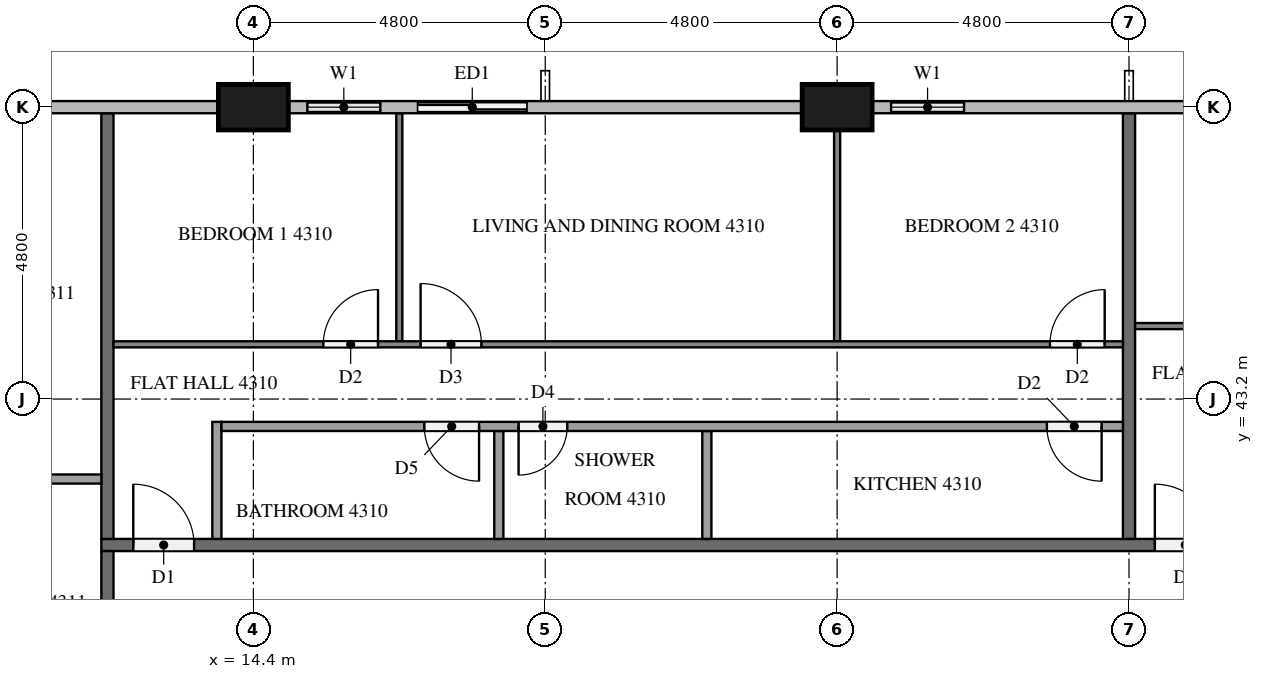
"""IFC4 building model, lengths in metres.
Left out: names, types, materials, properties, quantities, classifications, styles, units other than length and angle.
Written with IfcOpenShell. Run it as: python <this file> out.ifc"""

import sys

from ifc_helpers import new_model, si_unit, direction, frame, frame_2d, origin, origin_2d, place, context, subcontext, project, spatial, rectangle, extrude, element, fill, save


model = new_model("IFC4")
c1 = context("Model", 3, precision=1e-05, world=origin(), true_north=direction((0.0, 1.0)))
c2 = subcontext(c1, "Body", "Model", "MODEL_VIEW")
j1 = project(units=[si_unit("LENGTHUNIT", "METRE"), si_unit("PLANEANGLEUNIT", "RADIAN")], contexts=[c1])
p1 = place(None, origin())
s1 = spatial("IfcSite", under=j1, at=p1, CompositionType="ELEMENT")
p2 = place(p1, origin())
s2 = spatial("IfcBuilding", under=s1, at=p2, CompositionType="ELEMENT")
p3 = place(p2, frame((0.0, 0.0, 166.5)))
s3 = spatial("IfcBuildingStorey", under=s2, at=p3, CompositionType="ELEMENT", Elevation=166.5)
for number, where, z_axis, x_axis in (
    (1, (24.0, 48.0, 0.0), (0.0, 0.0, 1.0), (1.0, 0.0, 0.0)),
    (2, (14.4, 48.0, 0.0), (0.0, 0.0, 1.0), (1.0, 0.0, 0.0)),
):
    element("IfcColumn", number, at=place(p3, frame(where, z_axis=z_axis, x_axis=x_axis)), inside=s3, PredefinedType="COLUMN", context=c2, shape_type="SweptSolid", body=[
        extrude(rectangle(XDim=1.15, YDim=0.75, at=origin_2d()), origin(), (0.0, 0.0, 1.0), 3.2),
    ])
p4 = place(p3, frame((26.4, 48.0, 0.0), z_axis=(0.0, 0.0, 1.0), x_axis=(-1.0, 0.0, 0.0)))
e3 = element("IfcWall", 3, at=p4, inside=s3, PredefinedType="SOLIDWALL", context=c2, shape_type="SweptSolid", body=[
    extrude(rectangle(XDim=1.825, YDim=0.15, at=frame_2d((0.913, 0.0))), origin(), (0.0, 0.0, 1.0), 3.2),
])
p5 = place(p4, frame((0.312, 0.0, 0.9)))
e4 = element("IfcOpeningElement", 4, at=p5, cuts=e3, PredefinedType="OPENING", context=c2, shape_type="SweptSolid", body=[
    extrude(rectangle(XDim=1.2, YDim=1.4, at=frame_2d((0.6, 0.7))), frame((0.0, 0.085, 0.0), z_axis=(0.0, -1.0, 0.0), x_axis=(1.0, 0.0, 0.0)), (0.0, 0.0, 1.0), 0.17),
])
p6 = place(p3, frame((19.2, 48.0, 0.0), z_axis=(0.0, 0.0, 1.0), x_axis=(-1.0, 0.0, 0.0)))
e5 = element("IfcWall", 5, at=p6, inside=s3, PredefinedType="SOLIDWALL", context=c2, shape_type="SweptSolid", body=[
    extrude(rectangle(XDim=4.225, YDim=0.15, at=frame_2d((2.112, 0.0))), origin(), (0.0, 0.0, 1.0), 3.2),
])
p7 = place(p6, frame((0.3, 0.0, 0.0)))
e6 = element("IfcOpeningElement", 6, at=p7, cuts=e5, PredefinedType="OPENING", context=c2, shape_type="SweptSolid", body=[
    extrude(rectangle(XDim=1.8, YDim=2.4, at=frame_2d((0.9, 1.2))), frame((0.0, 0.085, 0.0), z_axis=(0.0, -1.0, 0.0), x_axis=(1.0, 0.0, 0.0)), (0.0, 0.0, 1.0), 0.17),
])
p8 = place(p6, frame((2.712, 0.0, 0.9)))
e7 = element("IfcOpeningElement", 7, at=p8, cuts=e5, PredefinedType="OPENING", context=c2, shape_type="SweptSolid", body=[
    extrude(rectangle(XDim=1.2, YDim=1.4, at=frame_2d((0.6, 0.7))), frame((0.0, 0.085, 0.0), z_axis=(0.0, -1.0, 0.0), x_axis=(1.0, 0.0, 0.0)), (0.0, 0.0, 1.0), 0.17),
])
p9 = place(p3, frame((11.9, 40.8, 0.0), z_axis=(0.0, 0.0, 1.0), x_axis=(1.0, 0.0, 0.0)))
e8 = element("IfcWall", 8, at=p9, inside=s3, PredefinedType="PARTITIONING", context=c2, shape_type="SweptSolid", body=[
    extrude(rectangle(XDim=38.6, YDim=0.2, at=frame_2d((19.3, 0.0))), origin(), (0.0, 0.0, 1.0), 3.2),
])
p10 = place(p9, frame((31.725, 0.0, 0.0)))
e9 = element("IfcOpeningElement", 9, at=p10, cuts=e8, PredefinedType="OPENING", context=c2, shape_type="SweptSolid", body=[
    extrude(rectangle(XDim=1.0, YDim=2.1, at=frame_2d((0.5, 1.05))), frame((0.0, 0.11, 0.0), z_axis=(0.0, -1.0, 0.0), x_axis=(1.0, 0.0, 0.0)), (0.0, 0.0, 1.0), 0.22),
])
p11 = place(p9, frame((17.325, 0.0, 0.0)))
e10 = element("IfcOpeningElement", 10, at=p11, cuts=e8, PredefinedType="OPENING", context=c2, shape_type="SweptSolid", body=[
    extrude(rectangle(XDim=1.0, YDim=2.1, at=frame_2d((0.5, 1.05))), frame((0.0, 0.11, 0.0), z_axis=(0.0, -1.0, 0.0), x_axis=(1.0, 0.0, 0.0)), (0.0, 0.0, 1.0), 0.22),
])
p12 = place(p9, frame((0.525, 0.0, 0.0)))
e11 = element("IfcOpeningElement", 11, at=p12, cuts=e8, PredefinedType="OPENING", context=c2, shape_type="SweptSolid", body=[
    extrude(rectangle(XDim=1.0, YDim=2.1, at=frame_2d((0.5, 1.05))), frame((0.0, 0.11, 0.0), z_axis=(0.0, -1.0, 0.0), x_axis=(1.0, 0.0, 0.0)), (0.0, 0.0, 1.0), 0.22),
])
p13 = place(p3, frame((12.0, 12.1, 0.0), z_axis=(0.0, 0.0, 1.0), x_axis=(0.0, 1.0, 0.0)))
e12 = element("IfcWall", 12, at=p13, inside=s3, PredefinedType="PARTITIONING", context=c2, shape_type="SweptSolid", body=[
    extrude(rectangle(XDim=28.6, YDim=0.2, at=frame_2d((14.3, 0.0))), origin(), (0.0, 0.0, 1.0), 3.2),
])
p14 = place(p13, frame((24.325, 0.0, 0.0)))
e13 = element("IfcOpeningElement", 13, at=p14, cuts=e12, PredefinedType="OPENING", context=c2, shape_type="SweptSolid", body=[
    extrude(rectangle(XDim=1.0, YDim=2.1, at=frame_2d((0.5, 1.05))), frame((0.0, 0.11, 0.0), z_axis=(0.0, -1.0, 0.0), x_axis=(1.0, 0.0, 0.0)), (0.0, 0.0, 1.0), 0.22),
])
p15 = place(p13, frame((22.475, 0.0, 0.0)))
e14 = element("IfcOpeningElement", 14, at=p15, cuts=e12, PredefinedType="OPENING", context=c2, shape_type="SweptSolid", body=[
    extrude(rectangle(XDim=1.0, YDim=2.1, at=frame_2d((0.5, 1.05))), frame((0.0, 0.11, 0.0), z_axis=(0.0, -1.0, 0.0), x_axis=(1.0, 0.0, 0.0)), (0.0, 0.0, 1.0), 0.22),
])
p16 = place(p13, frame((0.325, 0.0, 0.0)))
e15 = element("IfcOpeningElement", 15, at=p16, cuts=e12, PredefinedType="OPENING", context=c2, shape_type="SweptSolid", body=[
    extrude(rectangle(XDim=1.0, YDim=2.1, at=frame_2d((0.5, 1.05))), frame((0.0, 0.11, 0.0), z_axis=(0.0, -1.0, 0.0), x_axis=(1.0, 0.0, 0.0)), (0.0, 0.0, 1.0), 0.22),
])
for number, where, z_axis, x_axis in (
    (16, (28.8, 47.9, 0.0), (0.0, 0.0, 1.0), (0.0, -1.0, 0.0)),
    (17, (12.0, 47.9, 0.0), (0.0, 0.0, 1.0), (0.0, -1.0, 0.0)),
):
    element("IfcWall", number, at=place(p3, frame(where, z_axis=z_axis, x_axis=x_axis)), inside=s3, PredefinedType="PARTITIONING", context=c2, shape_type="SweptSolid", body=[
        extrude(rectangle(XDim=7.0, YDim=0.2, at=frame_2d((3.5, 0.0))), origin(), (0.0, 0.0, 1.0), 3.2),
    ])
p17 = place(p3, frame((28.9, 44.4, 0.0), z_axis=(0.0, 0.0, 1.0), x_axis=(1.0, 0.0, 0.0)))
e18 = element("IfcWall", 18, at=p17, inside=s3, PredefinedType="PARTITIONING", context=c2, shape_type="SweptSolid", body=[
    extrude(rectangle(XDim=14.2, YDim=0.1, at=frame_2d((7.1, 0.0))), origin(), (0.0, 0.0, 1.0), 3.2),
])
p18 = place(p17, frame((3.45, 0.0, 0.0)))
e19 = element("IfcOpeningElement", 19, at=p18, cuts=e18, PredefinedType="OPENING", context=c2, shape_type="SweptSolid", body=[
    extrude(rectangle(XDim=0.9, YDim=2.1, at=frame_2d((0.45, 1.05))), frame((0.0, 0.06, 0.0), z_axis=(0.0, -1.0, 0.0), x_axis=(1.0, 0.0, 0.0)), (0.0, 0.0, 1.0), 0.12),
])
p19 = place(p17, frame((5.05, 0.0, 0.0)))
e20 = element("IfcOpeningElement", 20, at=p19, cuts=e18, PredefinedType="OPENING", context=c2, shape_type="SweptSolid", body=[
    extrude(rectangle(XDim=0.9, YDim=2.1, at=frame_2d((0.45, 1.05))), frame((0.0, 0.06, 0.0), z_axis=(0.0, -1.0, 0.0), x_axis=(1.0, 0.0, 0.0)), (0.0, 0.0, 1.0), 0.12),
])
p20 = place(p17, frame((12.9, 0.0, 0.0)))
e21 = element("IfcOpeningElement", 21, at=p20, cuts=e18, PredefinedType="OPENING", context=c2, shape_type="SweptSolid", body=[
    extrude(rectangle(XDim=1.0, YDim=2.1, at=frame_2d((0.5, 1.05))), frame((0.0, 0.06, 0.0), z_axis=(0.0, -1.0, 0.0), x_axis=(1.0, 0.0, 0.0)), (0.0, 0.0, 1.0), 0.12),
])
p21 = place(p3, frame((16.8, 44.15, 0.0), z_axis=(0.0, 0.0, 1.0), x_axis=(0.0, 1.0, 0.0)))
e22 = element("IfcWall", 22, at=p21, inside=s3, PredefinedType="PARTITIONING", context=c2, shape_type="SweptSolid", body=[
    extrude(rectangle(XDim=3.75, YDim=0.1, at=frame_2d((1.875, 0.0))), origin(), (0.0, 0.0, 1.0), 3.2),
])
p22 = place(p3, frame((24.0, 44.15, 0.0), z_axis=(0.0, 0.0, 1.0), x_axis=(0.0, 1.0, 0.0)))
e23 = element("IfcWall", 23, at=p22, inside=s3, PredefinedType="PARTITIONING", context=c2, shape_type="SweptSolid", body=[
    extrude(rectangle(XDim=3.475, YDim=0.1, at=frame_2d((1.738, 0.0))), origin(), (0.0, 0.0, 1.0), 3.2),
])
p23 = place(p3, frame((12.1, 44.1, 0.0), z_axis=(0.0, 0.0, 1.0), x_axis=(1.0, 0.0, 0.0)))
e24 = element("IfcWall", 24, at=p23, inside=s3, PredefinedType="PARTITIONING", context=c2, shape_type="SweptSolid", body=[
    extrude(rectangle(XDim=16.6, YDim=0.1, at=frame_2d((8.3, 0.0))), origin(), (0.0, 0.0, 1.0), 3.2),
])
p24 = place(p23, frame((3.45, 0.0, 0.0)))
e25 = element("IfcOpeningElement", 25, at=p24, cuts=e24, PredefinedType="OPENING", context=c2, shape_type="SweptSolid", body=[
    extrude(rectangle(XDim=0.9, YDim=2.1, at=frame_2d((0.45, 1.05))), frame((0.0, 0.06, 0.0), z_axis=(0.0, -1.0, 0.0), x_axis=(1.0, 0.0, 0.0)), (0.0, 0.0, 1.0), 0.12),
])
p25 = place(p23, frame((5.05, 0.0, 0.0)))
e26 = element("IfcOpeningElement", 26, at=p25, cuts=e24, PredefinedType="OPENING", context=c2, shape_type="SweptSolid", body=[
    extrude(rectangle(XDim=1.0, YDim=2.1, at=frame_2d((0.5, 1.05))), frame((0.0, 0.06, 0.0), z_axis=(0.0, -1.0, 0.0), x_axis=(1.0, 0.0, 0.0)), (0.0, 0.0, 1.0), 0.12),
])
p26 = place(p23, frame((15.4, 0.0, 0.0)))
e27 = element("IfcOpeningElement", 27, at=p26, cuts=e24, PredefinedType="OPENING", context=c2, shape_type="SweptSolid", body=[
    extrude(rectangle(XDim=0.9, YDim=2.1, at=frame_2d((0.45, 1.05))), frame((0.0, 0.06, 0.0), z_axis=(0.0, -1.0, 0.0), x_axis=(1.0, 0.0, 0.0)), (0.0, 0.0, 1.0), 0.12),
])
for number, where, z_axis, x_axis in (
    (28, (18.437, 40.9, 0.0), (0.0, 0.0, 1.0), (0.0, 1.0, 0.0)),
    (29, (21.858, 40.9, 0.0), (0.0, 0.0, 1.0), (0.0, 1.0, 0.0)),
):
    element("IfcWall", number, at=place(p3, frame(where, z_axis=z_axis, x_axis=x_axis)), inside=s3, PredefinedType="PARTITIONING", context=c2, shape_type="SweptSolid", body=[
        extrude(rectangle(XDim=1.775, YDim=0.15, at=frame_2d((0.888, 0.0))), origin(), (0.0, 0.0, 1.0), 3.2),
    ])
p27 = place(p3, frame((13.8, 40.9, 0.0), z_axis=(0.0, 0.0, 1.0), x_axis=(0.0, 1.0, 0.0)))
e30 = element("IfcWall", 30, at=p27, inside=s3, PredefinedType="PARTITIONING", context=c2, shape_type="SweptSolid", body=[
    extrude(rectangle(XDim=1.925, YDim=0.15, at=frame_2d((0.962, 0.0))), origin(), (0.0, 0.0, 1.0), 3.2),
])
p28 = place(p3, frame((28.7, 42.75, 0.0), z_axis=(0.0, 0.0, 1.0), x_axis=(-1.0, 0.0, 0.0)))
e31 = element("IfcWall", 31, at=p28, inside=s3, PredefinedType="PARTITIONING", context=c2, shape_type="SweptSolid", body=[
    extrude(rectangle(XDim=14.825, YDim=0.15, at=frame_2d((7.413, 0.0))), origin(), (0.0, 0.0, 1.0), 3.2),
])
p29 = place(p28, frame((10.588, 0.0, 0.0)))
e32 = element("IfcOpeningElement", 32, at=p29, cuts=e31, PredefinedType="OPENING", context=c2, shape_type="SweptSolid", body=[
    extrude(rectangle(XDim=0.9, YDim=2.1, at=frame_2d((0.45, 1.05))), frame((0.0, 0.085, 0.0), z_axis=(0.0, -1.0, 0.0), x_axis=(1.0, 0.0, 0.0)), (0.0, 0.0, 1.0), 0.17),
])
p30 = place(p28, frame((9.138, 0.0, 0.0)))
e33 = element("IfcOpeningElement", 33, at=p30, cuts=e31, PredefinedType="OPENING", context=c2, shape_type="SweptSolid", body=[
    extrude(rectangle(XDim=0.8, YDim=2.1, at=frame_2d((0.4, 1.05))), frame((0.0, 0.085, 0.0), z_axis=(0.0, -1.0, 0.0), x_axis=(1.0, 0.0, 0.0)), (0.0, 0.0, 1.0), 0.17),
])
p31 = place(p28, frame((0.35, 0.0, 0.0)))
e34 = element("IfcOpeningElement", 34, at=p31, cuts=e31, PredefinedType="OPENING", context=c2, shape_type="SweptSolid", body=[
    extrude(rectangle(XDim=0.9, YDim=2.1, at=frame_2d((0.45, 1.05))), frame((0.0, 0.085, 0.0), z_axis=(0.0, -1.0, 0.0), x_axis=(1.0, 0.0, 0.0)), (0.0, 0.0, 1.0), 0.17),
])
p32 = place(p3, frame((11.9, 41.885, 0.0), z_axis=(0.0, 0.0, 1.0), x_axis=(-1.0, 0.0, 0.0)))
e35 = element("IfcWall", 35, at=p32, inside=s3, PredefinedType="PARTITIONING", context=c2, shape_type="SweptSolid", body=[
    extrude(rectangle(XDim=2.975, YDim=0.15, at=frame_2d((1.487, 0.0))), origin(), (0.0, 0.0, 1.0), 3.2),
])
p33 = place(p5, origin())
e36 = element("IfcWindow", 36, at=p33, inside=s3, PartitioningType="SINGLE_PANEL", PredefinedType="WINDOW", context=c2, shape_type="SweptSolid", body=[
    extrude(rectangle(XDim=1.2, YDim=1.4, at=frame_2d((0.6, 0.7))), frame((0.0, 0.03, 0.0), z_axis=(0.0, -1.0, 0.0), x_axis=(1.0, 0.0, 0.0)), (0.0, 0.0, 1.0), 0.06),
])
fill(e4, e36)
p34 = place(p7, origin())
e37 = element("IfcDoor", 37, at=p34, inside=s3, OperationType="SLIDING_TO_RIGHT", PredefinedType="DOOR", context=c2, shape_type="SweptSolid", body=[
    extrude(rectangle(XDim=1.8, YDim=2.4, at=frame_2d((0.9, 1.2))), frame((0.0, 0.025, 0.0), z_axis=(0.0, -1.0, 0.0), x_axis=(1.0, 0.0, 0.0)), (0.0, 0.0, 1.0), 0.05),
])
fill(e6, e37)
p35 = place(p8, origin())
e38 = element("IfcWindow", 38, at=p35, inside=s3, PartitioningType="SINGLE_PANEL", PredefinedType="WINDOW", context=c2, shape_type="SweptSolid", body=[
    extrude(rectangle(XDim=1.2, YDim=1.4, at=frame_2d((0.6, 0.7))), frame((0.0, 0.03, 0.0), z_axis=(0.0, -1.0, 0.0), x_axis=(1.0, 0.0, 0.0)), (0.0, 0.0, 1.0), 0.06),
])
fill(e7, e38)
p36 = place(p11, origin())
e39 = element("IfcDoor", 39, at=p36, inside=s3, OperationType="SINGLE_SWING_LEFT", PredefinedType="DOOR", context=c2, shape_type="SweptSolid", body=[
    extrude(rectangle(XDim=1.0, YDim=2.1, at=frame_2d((0.5, 1.05))), frame((0.0, 0.025, 0.0), z_axis=(0.0, -1.0, 0.0), x_axis=(1.0, 0.0, 0.0)), (0.0, 0.0, 1.0), 0.05),
])
fill(e10, e39)
p37 = place(p12, origin())
e40 = element("IfcDoor", 40, at=p37, inside=s3, OperationType="SINGLE_SWING_LEFT", PredefinedType="DOOR", context=c2, shape_type="SweptSolid", body=[
    extrude(rectangle(XDim=1.0, YDim=2.1, at=frame_2d((0.5, 1.05))), frame((0.0, 0.025, 0.0), z_axis=(0.0, -1.0, 0.0), x_axis=(1.0, 0.0, 0.0)), (0.0, 0.0, 1.0), 0.05),
])
fill(e11, e40)
p38 = place(p24, origin())
e41 = element("IfcDoor", 41, at=p38, inside=s3, OperationType="SINGLE_SWING_RIGHT", PredefinedType="DOOR", context=c2, shape_type="SweptSolid", body=[
    extrude(rectangle(XDim=0.9, YDim=2.1, at=frame_2d((0.45, 1.05))), frame((0.0, 0.025, 0.0), z_axis=(0.0, -1.0, 0.0), x_axis=(1.0, 0.0, 0.0)), (0.0, 0.0, 1.0), 0.05),
])
fill(e25, e41)
p39 = place(p25, origin())
e42 = element("IfcDoor", 42, at=p39, inside=s3, OperationType="SINGLE_SWING_LEFT", PredefinedType="DOOR", context=c2, shape_type="SweptSolid", body=[
    extrude(rectangle(XDim=1.0, YDim=2.1, at=frame_2d((0.5, 1.05))), frame((0.0, 0.025, 0.0), z_axis=(0.0, -1.0, 0.0), x_axis=(1.0, 0.0, 0.0)), (0.0, 0.0, 1.0), 0.05),
])
fill(e26, e42)
p40 = place(p26, origin())
e43 = element("IfcDoor", 43, at=p40, inside=s3, OperationType="SINGLE_SWING_RIGHT", PredefinedType="DOOR", context=c2, shape_type="SweptSolid", body=[
    extrude(rectangle(XDim=0.9, YDim=2.1, at=frame_2d((0.45, 1.05))), frame((0.0, 0.025, 0.0), z_axis=(0.0, -1.0, 0.0), x_axis=(1.0, 0.0, 0.0)), (0.0, 0.0, 1.0), 0.05),
])
fill(e27, e43)
p41 = place(p29, origin())
e44 = element("IfcDoor", 44, at=p41, inside=s3, OperationType="SINGLE_SWING_LEFT", PredefinedType="DOOR", context=c2, shape_type="SweptSolid", body=[
    extrude(rectangle(XDim=0.9, YDim=2.1, at=frame_2d((0.45, 1.05))), frame((0.0, 0.025, 0.0), z_axis=(0.0, -1.0, 0.0), x_axis=(1.0, 0.0, 0.0)), (0.0, 0.0, 1.0), 0.05),
])
fill(e32, e44)
p42 = place(p30, origin())
e45 = element("IfcDoor", 45, at=p42, inside=s3, OperationType="SINGLE_SWING_RIGHT", PredefinedType="DOOR", context=c2, shape_type="SweptSolid", body=[
    extrude(rectangle(XDim=0.8, YDim=2.1, at=frame_2d((0.4, 1.05))), frame((0.0, 0.025, 0.0), z_axis=(0.0, -1.0, 0.0), x_axis=(1.0, 0.0, 0.0)), (0.0, 0.0, 1.0), 0.05),
])
fill(e33, e45)
p43 = place(p31, origin())
e46 = element("IfcDoor", 46, at=p43, inside=s3, OperationType="SINGLE_SWING_LEFT", PredefinedType="DOOR", context=c2, shape_type="SweptSolid", body=[
    extrude(rectangle(XDim=0.9, YDim=2.1, at=frame_2d((0.45, 1.05))), frame((0.0, 0.025, 0.0), z_axis=(0.0, -1.0, 0.0), x_axis=(1.0, 0.0, 0.0)), (0.0, 0.0, 1.0), 0.05),
])
fill(e34, e46)
save(model, sys.argv[1])
